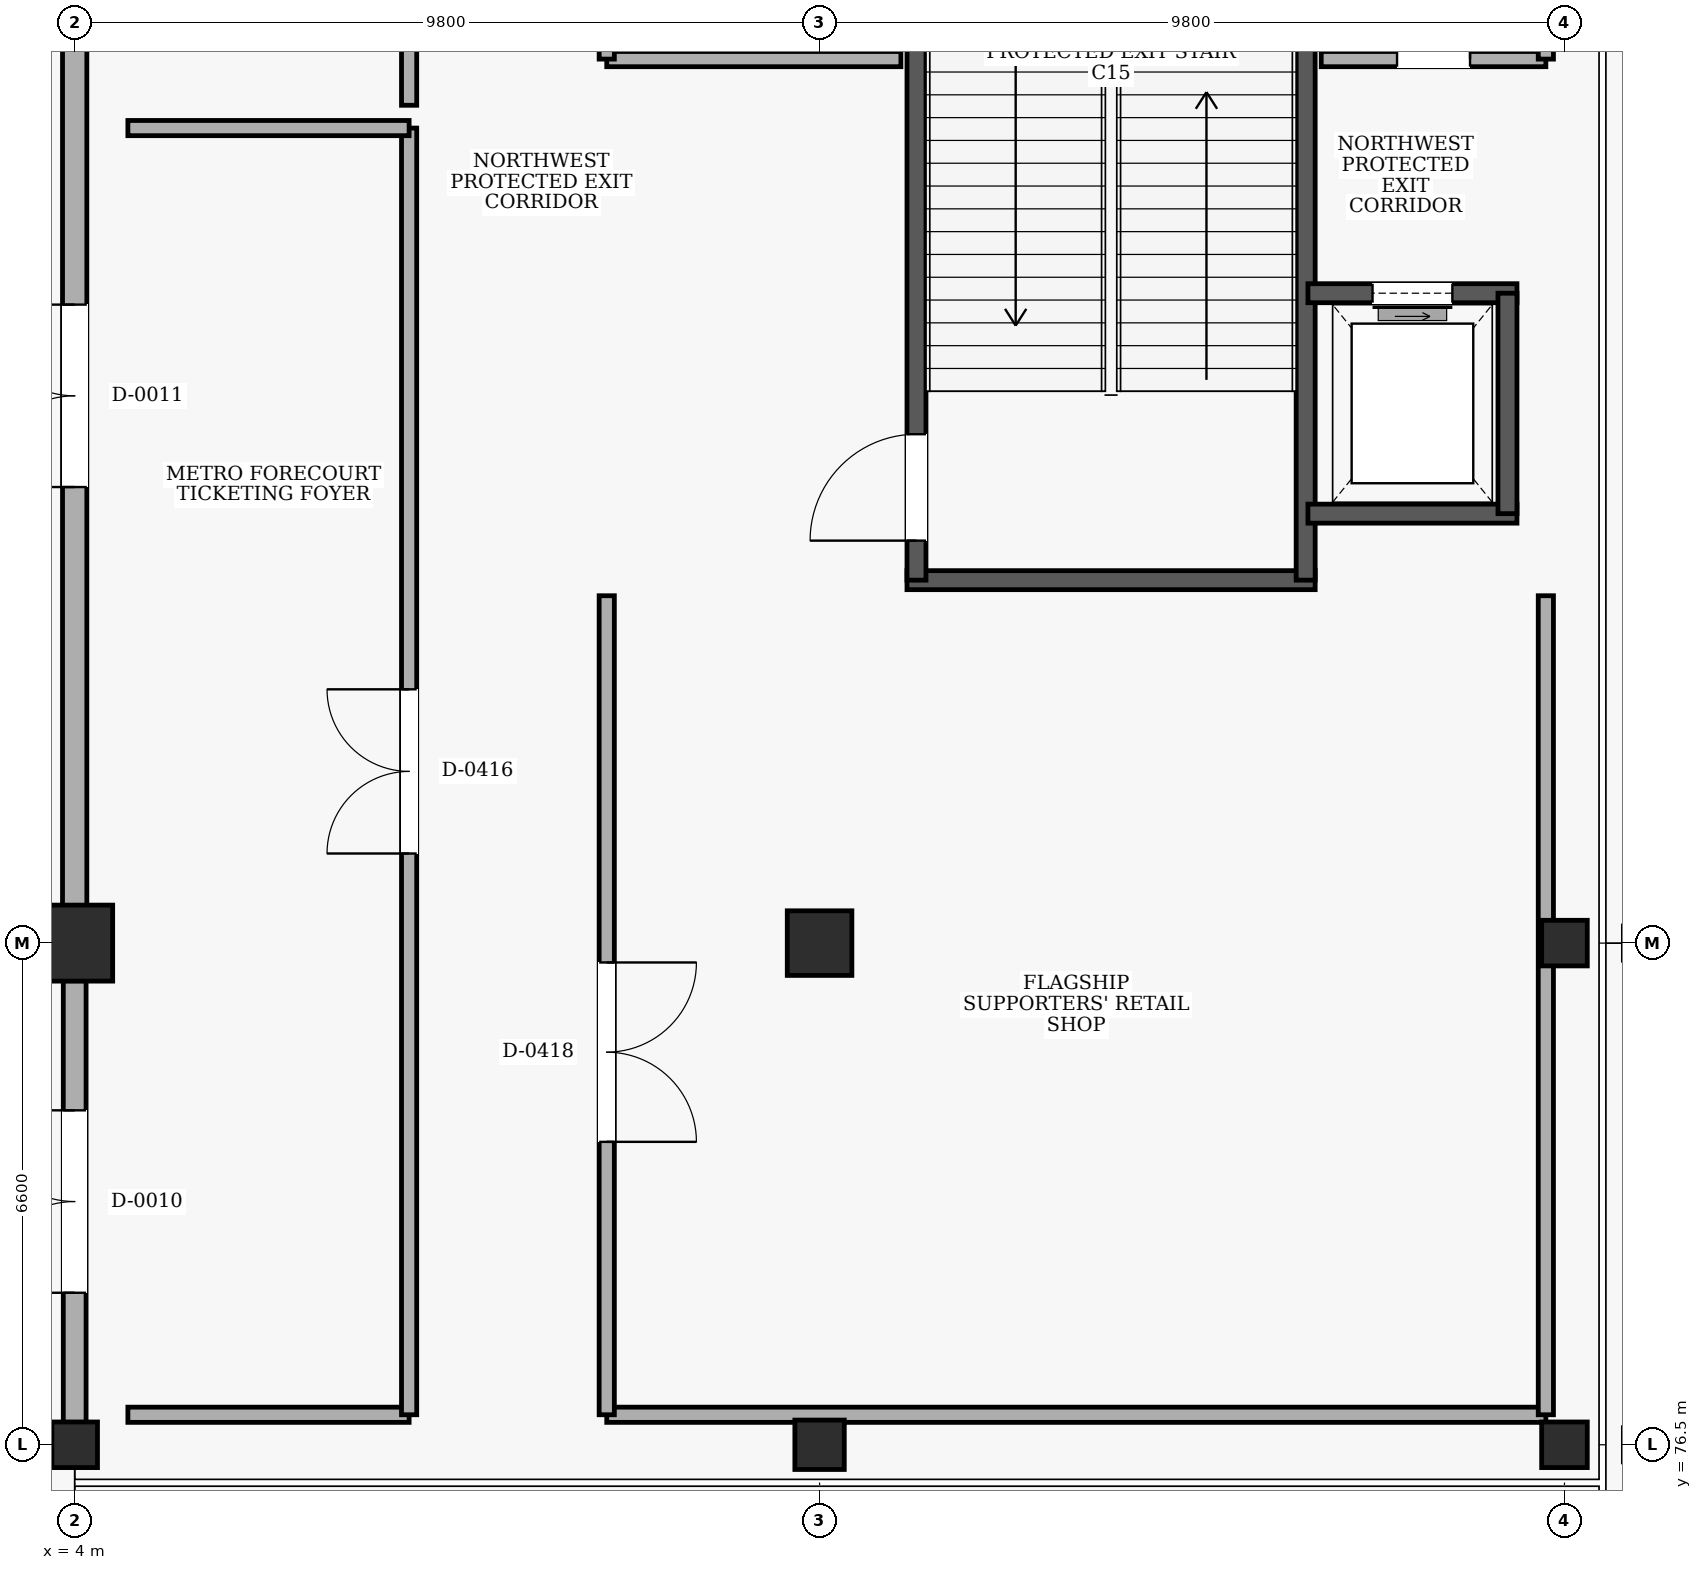
"""IFC4 building model, lengths in metres.
Left out: names, types, materials, properties, quantities, classifications, styles, units other than length and angle.
Written with IfcOpenShell. Run it as: python <this file> out.ifc"""

import sys

from ifc_helpers import new_model, si_unit, direction, frame, frame_2d, origin, origin_2d, place, context, subcontext, project, spatial, rectangle, extrude, element, fill, save


model = new_model("IFC4")
c1 = context("Model", 3, precision=1e-05, world=origin(), true_north=direction((0.0, 1.0)))
c2 = subcontext(c1, "Body", "Model", "MODEL_VIEW")
j1 = project(units=[si_unit("LENGTHUNIT", "METRE"), si_unit("PLANEANGLEUNIT", "RADIAN")], contexts=[c1])
p1 = place(None, origin())
s1 = spatial("IfcSite", under=j1, at=p1, CompositionType="ELEMENT")
p2 = place(p1, origin())
s2 = spatial("IfcBuilding", under=s1, at=p2, CompositionType="ELEMENT")
p3 = place(p2, origin())
s3 = spatial("IfcBuildingStorey", under=s2, at=p3, CompositionType="ELEMENT", Elevation=0.0)
p4 = place(p3, frame((4.0, 76.5, 0.0), z_axis=(0.0, 0.0, 1.0), x_axis=(1.0, 0.0, 0.0)))
e1 = element("IfcColumn", 1, at=p4, inside=s3, PredefinedType="COLUMN", context=c2, shape_type="SweptSolid", body=[
    extrude(rectangle(XDim=0.6, YDim=0.6, at=origin_2d()), origin(), (0.0, 0.0, 1.0), 5.4),
])
p5 = place(p3, frame((4.0, 83.1, 0.0), z_axis=(0.0, 0.0, 1.0), x_axis=(1.0, 0.0, 0.0)))
e2 = element("IfcColumn", 2, at=p5, inside=s3, PredefinedType="COLUMN", context=c2, shape_type="SweptSolid", body=[
    extrude(rectangle(XDim=1.0, YDim=1.0, at=origin_2d()), origin(), (0.0, 0.0, 1.0), 5.4),
])
p6 = place(p3, frame((13.8, 76.5, 0.0), z_axis=(0.0, 0.0, 1.0), x_axis=(1.0, 0.0, 0.0)))
e3 = element("IfcColumn", 3, at=p6, inside=s3, PredefinedType="COLUMN", context=c2, shape_type="SweptSolid", body=[
    extrude(rectangle(XDim=0.65, YDim=0.65, at=origin_2d()), origin(), (0.0, 0.0, 1.0), 5.4),
])
p7 = place(p3, frame((13.8, 83.1, 0.0), z_axis=(0.0, 0.0, 1.0), x_axis=(1.0, 0.0, 0.0)))
e4 = element("IfcColumn", 4, at=p7, inside=s3, PredefinedType="COLUMN", context=c2, shape_type="SweptSolid", body=[
    extrude(rectangle(XDim=0.85, YDim=0.85, at=origin_2d()), origin(), (0.0, 0.0, 1.0), 5.4),
])
for number, where, z_axis, x_axis in (
    (5, (23.6, 76.5, 0.0), (0.0, 0.0, 1.0), (1.0, 0.0, 0.0)),
    (6, (23.6, 83.1, 0.0), (0.0, 0.0, 1.0), (1.0, 0.0, 0.0)),
):
    element("IfcColumn", number, at=place(p3, frame(where, z_axis=z_axis, x_axis=x_axis)), inside=s3, PredefinedType="COLUMN", context=c2, shape_type="SweptSolid", body=[
        extrude(rectangle(XDim=0.6, YDim=0.6, at=origin_2d()), origin(), (0.0, 0.0, 1.0), 5.4),
    ])
p8 = place(p3, frame((4.0, 76.795, 0.0), z_axis=(0.0, 0.0, 1.0), x_axis=(0.0, 1.0, 0.0)))
e7 = element("IfcWall", 7, at=p8, inside=s3, PredefinedType="SOLIDWALL", context=c2, shape_type="SweptSolid", body=[
    extrude(rectangle(XDim=5.81, YDim=0.3, at=frame_2d((2.905, 0.0))), origin(), (0.0, 0.0, 1.0), 4.31),
])
p9 = place(p8, frame((1.705, 0.0, 0.0)))
e8 = element("IfcOpeningElement", 8, at=p9, cuts=e7, PredefinedType="OPENING", context=c2, shape_type="SweptSolid", body=[
    extrude(rectangle(XDim=2.4, YDim=2.2, at=frame_2d((1.2, 1.1))), frame((0.0, 0.16, 0.0), z_axis=(0.0, -1.0, 0.0), x_axis=(1.0, 0.0, 0.0)), (0.0, 0.0, 1.0), 0.32),
])
p10 = place(p3, frame((4.0, 83.595, 0.0), z_axis=(0.0, 0.0, 1.0), x_axis=(0.0, 1.0, 0.0)))
e9 = element("IfcWall", 9, at=p10, inside=s3, PredefinedType="SOLIDWALL", context=c2, shape_type="SweptSolid", body=[
    extrude(rectangle(XDim=13.41, YDim=0.32, at=frame_2d((6.705, 0.0))), origin(), (0.0, 0.0, 1.0), 4.61),
])
p11 = place(p10, frame((5.505, 0.0, 0.0)))
e10 = element("IfcOpeningElement", 10, at=p11, cuts=e9, PredefinedType="OPENING", context=c2, shape_type="SweptSolid", body=[
    extrude(rectangle(XDim=2.4, YDim=2.2, at=frame_2d((1.2, 1.1))), frame((0.0, 0.17, 0.0), z_axis=(0.0, -1.0, 0.0), x_axis=(1.0, 0.0, 0.0)), (0.0, 0.0, 1.0), 0.34),
])
p12 = place(p3, frame((14.95, 87.875, 0.0), z_axis=(0.0, 0.0, 1.0), x_axis=(1.0, 0.0, 0.0)))
e11 = element("IfcWall", 11, at=p12, inside=s3, PredefinedType="SHEAR", context=c2, shape_type="SweptSolid", body=[
    extrude(rectangle(XDim=5.37, YDim=0.25, at=frame_2d((2.685, 0.0))), origin(), (0.0, 0.0, 1.0), 5.08),
])
p13 = place(p3, frame((15.075, 87.875, 0.0), z_axis=(0.0, 0.0, 1.0), x_axis=(0.0, 1.0, 0.0)))
e12 = element("IfcWall", 12, at=p13, inside=s3, PredefinedType="SHEAR", context=c2, shape_type="SweptSolid", body=[
    extrude(rectangle(XDim=10.85, YDim=0.25, at=frame_2d((5.425, 0.0))), origin(), (0.0, 0.0, 1.0), 5.08),
])
p14 = place(p13, frame((0.52, 0.0, 0.0)))
e13 = element("IfcOpeningElement", 13, at=p14, cuts=e12, PredefinedType="OPENING", context=c2, shape_type="SweptSolid", body=[
    extrude(rectangle(XDim=1.4, YDim=2.15, at=frame_2d((0.7, 1.075))), frame((0.0, 0.135, 0.0), z_axis=(0.0, -1.0, 0.0), x_axis=(1.0, 0.0, 0.0)), (0.0, 0.0, 1.0), 0.27),
])
p15 = place(p3, frame((20.195, 87.875, 0.0), z_axis=(0.0, 0.0, 1.0), x_axis=(0.0, 1.0, 0.0)))
e14 = element("IfcWall", 14, at=p15, inside=s3, PredefinedType="SHEAR", context=c2, shape_type="SweptSolid", body=[
    extrude(rectangle(XDim=10.85, YDim=0.25, at=frame_2d((5.425, 0.0))), origin(), (0.0, 0.0, 1.0), 5.08),
])
p16 = place(p3, frame((20.225, 88.75, 0.0), z_axis=(0.0, 0.0, 1.0), x_axis=(1.0, 0.0, 0.0)))
e15 = element("IfcWall", 15, at=p16, inside=s3, PredefinedType="SHEAR", context=c2, shape_type="SweptSolid", body=[
    extrude(rectangle(XDim=2.75, YDim=0.25, at=frame_2d((1.375, 0.0))), origin(), (0.0, 0.0, 1.0), 5.08),
])
p17 = place(p3, frame((22.975, 91.65, 0.0), z_axis=(0.0, 0.0, 1.0), x_axis=(-1.0, 0.0, 0.0)))
e16 = element("IfcWall", 16, at=p17, inside=s3, PredefinedType="SHEAR", context=c2, shape_type="SweptSolid", body=[
    extrude(rectangle(XDim=2.75, YDim=0.25, at=frame_2d((1.375, 0.0))), origin(), (0.0, 0.0, 1.0), 5.08),
])
p18 = place(p17, frame((0.85, 0.0, 0.0)))
e17 = element("IfcOpeningElement", 17, at=p18, cuts=e16, PredefinedType="OPENING", context=c2, shape_type="SweptSolid", body=[
    extrude(rectangle(XDim=1.05, YDim=2.15, at=frame_2d((0.525, 1.075))), frame((0.0, 0.135, 0.0), z_axis=(0.0, -1.0, 0.0), x_axis=(1.0, 0.0, 0.0)), (0.0, 0.0, 1.0), 0.27),
])
p19 = place(p3, frame((22.85, 88.75, 0.0), z_axis=(0.0, 0.0, 1.0), x_axis=(0.0, 1.0, 0.0)))
e18 = element("IfcWall", 18, at=p19, inside=s3, PredefinedType="SHEAR", context=c2, shape_type="SweptSolid", body=[
    extrude(rectangle(XDim=2.9, YDim=0.25, at=frame_2d((1.45, 0.0))), origin(), (0.0, 0.0, 1.0), 5.08),
])
p20 = place(p3, frame((4.7, 76.895, 0.0), z_axis=(0.0, 0.0, 1.0), x_axis=(1.0, 0.0, 0.0)))
e19 = element("IfcWall", 19, at=p20, inside=s3, PredefinedType="PARTITIONING", context=c2, shape_type="SweptSolid", body=[
    extrude(rectangle(XDim=3.7, YDim=0.2, at=frame_2d((1.85, 0.0))), origin(), (0.0, 0.0, 1.0), 4.21),
])
p21 = place(p3, frame((8.4, 76.895, 0.0), z_axis=(0.0, 0.0, 1.0), x_axis=(0.0, 1.0, 0.0)))
e20 = element("IfcWall", 20, at=p21, inside=s3, PredefinedType="PARTITIONING", context=c2, shape_type="SweptSolid", body=[
    extrude(rectangle(XDim=16.927, YDim=0.2, at=frame_2d((8.464, 0.0))), origin(), (0.0, 0.0, 1.0), 5.08),
])
p22 = place(p21, frame((7.384, 0.0, 0.0)))
e21 = element("IfcOpeningElement", 21, at=p22, cuts=e20, PredefinedType="OPENING", context=c2, shape_type="SweptSolid", body=[
    extrude(rectangle(XDim=2.16, YDim=2.35, at=frame_2d((1.08, 1.175))), frame((0.0, 0.11, 0.0), z_axis=(0.0, -1.0, 0.0), x_axis=(1.0, 0.0, 0.0)), (0.0, 0.0, 1.0), 0.22),
])
p23 = place(p3, frame((8.4, 93.823, 0.0), z_axis=(0.0, 0.0, 1.0), x_axis=(-1.0, 0.0, 0.0)))
e22 = element("IfcWall", 22, at=p23, inside=s3, PredefinedType="PARTITIONING", context=c2, shape_type="SweptSolid", body=[
    extrude(rectangle(XDim=3.7, YDim=0.2, at=frame_2d((1.85, 0.0))), origin(), (0.0, 0.0, 1.0), 5.08),
])
p24 = place(p3, frame((8.4, 94.123, 0.0), z_axis=(0.0, 0.0, 1.0), x_axis=(0.0, 1.0, 0.0)))
e23 = element("IfcWall", 23, at=p24, inside=s3, PredefinedType="PARTITIONING", context=c2, shape_type="SweptSolid", body=[
    extrude(rectangle(XDim=16.927, YDim=0.2, at=frame_2d((8.464, 0.0))), origin(), (0.0, 0.0, 1.0), 5.08),
])
p25 = place(p24, frame((7.324, 0.0, 0.0)))
e24 = element("IfcOpeningElement", 24, at=p25, cuts=e23, PredefinedType="OPENING", context=c2, shape_type="SweptSolid", body=[
    extrude(rectangle(XDim=2.28, YDim=2.4, at=frame_2d((1.14, 1.2))), frame((0.0, 0.11, 0.0), z_axis=(0.0, -1.0, 0.0), x_axis=(1.0, 0.0, 0.0)), (0.0, 0.0, 1.0), 0.22),
])
p26 = place(p3, frame((11.0, 76.895, 0.0), z_axis=(0.0, 0.0, 1.0), x_axis=(1.0, 0.0, 0.0)))
e25 = element("IfcWall", 25, at=p26, inside=s3, PredefinedType="PARTITIONING", context=c2, shape_type="SweptSolid", body=[
    extrude(rectangle(XDim=12.355, YDim=0.2, at=frame_2d((6.177, 0.0))), origin(), (0.0, 0.0, 1.0), 4.21),
])
p27 = place(p3, frame((23.355, 76.895, 0.0), z_axis=(0.0, 0.0, 1.0), x_axis=(0.0, 1.0, 0.0)))
e26 = element("IfcWall", 26, at=p27, inside=s3, PredefinedType="PARTITIONING", context=c2, shape_type="SweptSolid", body=[
    extrude(rectangle(XDim=10.775, YDim=0.2, at=frame_2d((5.387, 0.0))), origin(), (0.0, 0.0, 1.0), 4.41),
])
p28 = place(p3, frame((11.0, 87.67, 0.0), z_axis=(0.0, 0.0, 1.0), x_axis=(0.0, -1.0, 0.0)))
e27 = element("IfcWall", 27, at=p28, inside=s3, PredefinedType="PARTITIONING", context=c2, shape_type="SweptSolid", body=[
    extrude(rectangle(XDim=10.775, YDim=0.2, at=frame_2d((5.387, 0.0))), origin(), (0.0, 0.0, 1.0), 5.08),
])
p29 = place(p28, frame((4.825, 0.0, 0.0)))
e28 = element("IfcOpeningElement", 28, at=p29, cuts=e27, PredefinedType="OPENING", context=c2, shape_type="SweptSolid", body=[
    extrude(rectangle(XDim=2.36, YDim=2.4, at=frame_2d((1.18, 1.2))), frame((0.0, 0.11, 0.0), z_axis=(0.0, -1.0, 0.0), x_axis=(1.0, 0.0, 0.0)), (0.0, 0.0, 1.0), 0.22),
])
p30 = place(p3, frame((11.0, 94.73, 0.0), z_axis=(0.0, 0.0, 1.0), x_axis=(1.0, 0.0, 0.0)))
e29 = element("IfcWall", 29, at=p30, inside=s3, PredefinedType="PARTITIONING", context=c2, shape_type="SweptSolid", body=[
    extrude(rectangle(XDim=3.87, YDim=0.2, at=frame_2d((1.935, 0.0))), origin(), (0.0, 0.0, 1.0), 5.08),
])
p31 = place(p3, frame((11.0, 98.93, 0.0), z_axis=(0.0, 0.0, 1.0), x_axis=(0.0, -1.0, 0.0)))
e30 = element("IfcWall", 30, at=p31, inside=s3, PredefinedType="PARTITIONING", context=c2, shape_type="SweptSolid", body=[
    extrude(rectangle(XDim=4.2, YDim=0.2, at=frame_2d((2.1, 0.0))), origin(), (0.0, 0.0, 1.0), 5.08),
])
p32 = place(p31, frame((1.64, 0.0, 0.0)))
e31 = element("IfcOpeningElement", 31, at=p32, cuts=e30, PredefinedType="OPENING", context=c2, shape_type="SweptSolid", body=[
    extrude(rectangle(XDim=0.92, YDim=2.1, at=frame_2d((0.46, 1.05))), frame((0.0, 0.11, 0.0), z_axis=(0.0, -1.0, 0.0), x_axis=(1.0, 0.0, 0.0)), (0.0, 0.0, 1.0), 0.22),
])
p33 = place(p3, frame((20.4, 94.73, 0.0), z_axis=(0.0, 0.0, 1.0), x_axis=(1.0, 0.0, 0.0)))
e32 = element("IfcWall", 32, at=p33, inside=s3, PredefinedType="PARTITIONING", context=c2, shape_type="SweptSolid", body=[
    extrude(rectangle(XDim=2.955, YDim=0.2, at=frame_2d((1.478, 0.0))), origin(), (0.0, 0.0, 1.0), 5.08),
])
p34 = place(p33, frame((0.998, 0.0, 0.0)))
e33 = element("IfcOpeningElement", 33, at=p34, cuts=e32, PredefinedType="OPENING", context=c2, shape_type="SweptSolid", body=[
    extrude(rectangle(XDim=0.96, YDim=2.1, at=frame_2d((0.48, 1.05))), frame((0.0, 0.11, 0.0), z_axis=(0.0, -1.0, 0.0), x_axis=(1.0, 0.0, 0.0)), (0.0, 0.0, 1.0), 0.22),
])
p35 = place(p3, frame((23.355, 94.73, 0.0), z_axis=(0.0, 0.0, 1.0), x_axis=(0.0, 1.0, 0.0)))
e34 = element("IfcWall", 34, at=p35, inside=s3, PredefinedType="PARTITIONING", context=c2, shape_type="SweptSolid", body=[
    extrude(rectangle(XDim=4.2, YDim=0.2, at=frame_2d((2.1, 0.0))), origin(), (0.0, 0.0, 1.0), 4.31),
])
p36 = place(p9, origin())
e35 = element("IfcDoor", 35, at=p36, inside=s3, OperationType="DOUBLE_DOOR_SINGLE_SWING", PredefinedType="DOOR", context=c2, shape_type="SweptSolid", body=[
    extrude(rectangle(XDim=2.4, YDim=2.2, at=frame_2d((1.2, 1.1))), frame((0.0, 0.025, 0.0), z_axis=(0.0, -1.0, 0.0), x_axis=(1.0, 0.0, 0.0)), (0.0, 0.0, 1.0), 0.05),
])
fill(e8, e35)
p37 = place(p11, origin())
e36 = element("IfcDoor", 36, at=p37, inside=s3, OperationType="DOUBLE_DOOR_SINGLE_SWING", PredefinedType="DOOR", context=c2, shape_type="SweptSolid", body=[
    extrude(rectangle(XDim=2.4, YDim=2.2, at=frame_2d((1.2, 1.1))), frame((0.0, 0.025, 0.0), z_axis=(0.0, -1.0, 0.0), x_axis=(1.0, 0.0, 0.0)), (0.0, 0.0, 1.0), 0.05),
])
fill(e10, e36)
p38 = place(p14, origin())
e37 = element("IfcDoor", 37, at=p38, inside=s3, OperationType="SINGLE_SWING_LEFT", PredefinedType="DOOR", context=c2, shape_type="SweptSolid", body=[
    extrude(rectangle(XDim=1.4, YDim=2.15, at=frame_2d((0.7, 1.075))), frame((0.0, 0.025, 0.0), z_axis=(0.0, -1.0, 0.0), x_axis=(1.0, 0.0, 0.0)), (0.0, 0.0, 1.0), 0.05),
])
fill(e13, e37)
p39 = place(p18, origin())
e38 = element("IfcDoor", 38, at=p39, inside=s3, OperationType="SLIDING_TO_RIGHT", PredefinedType="DOOR", context=c2, shape_type="SweptSolid", body=[
    extrude(rectangle(XDim=1.05, YDim=2.15, at=frame_2d((0.525, 1.075))), frame((0.0, 0.025, 0.0), z_axis=(0.0, -1.0, 0.0), x_axis=(1.0, 0.0, 0.0)), (0.0, 0.0, 1.0), 0.05),
])
fill(e17, e38)
p40 = place(p22, origin())
e39 = element("IfcDoor", 39, at=p40, inside=s3, OperationType="DOUBLE_DOOR_SINGLE_SWING", PredefinedType="DOOR", context=c2, shape_type="SweptSolid", body=[
    extrude(rectangle(XDim=2.16, YDim=2.35, at=frame_2d((1.08, 1.175))), frame((0.0, 0.025, 0.0), z_axis=(0.0, -1.0, 0.0), x_axis=(1.0, 0.0, 0.0)), (0.0, 0.0, 1.0), 0.05),
])
fill(e21, e39)
p41 = place(p29, origin())
e40 = element("IfcDoor", 40, at=p41, inside=s3, OperationType="DOUBLE_DOOR_SINGLE_SWING", PredefinedType="DOOR", context=c2, shape_type="SweptSolid", body=[
    extrude(rectangle(XDim=2.36, YDim=2.4, at=frame_2d((1.18, 1.2))), frame((0.0, 0.025, 0.0), z_axis=(0.0, -1.0, 0.0), x_axis=(1.0, 0.0, 0.0)), (0.0, 0.0, 1.0), 0.05),
])
fill(e28, e40)
p42 = place(p34, origin())
e41 = element("IfcDoor", 41, at=p42, inside=s3, OperationType="SINGLE_SWING_RIGHT", PredefinedType="DOOR", context=c2, shape_type="SweptSolid", body=[
    extrude(rectangle(XDim=0.96, YDim=2.1, at=frame_2d((0.48, 1.05))), frame((0.0, 0.025, 0.0), z_axis=(0.0, -1.0, 0.0), x_axis=(1.0, 0.0, 0.0)), (0.0, 0.0, 1.0), 0.05),
])
fill(e33, e41)
save(model, sys.argv[1])
